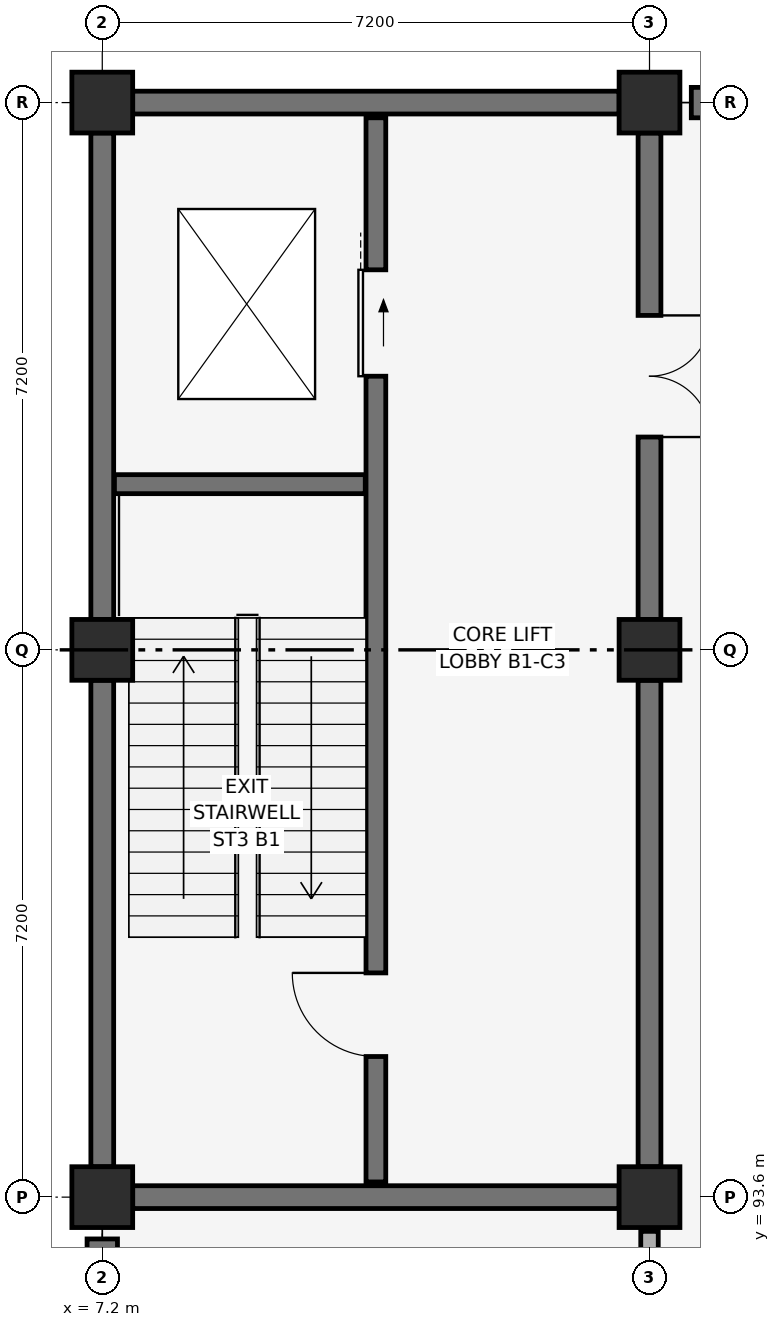
"""IFC4 building model, lengths in metres.
Left out: names, types, materials, properties, quantities, classifications, styles, units other than length and angle.
Written with IfcOpenShell. Run it as: python <this file> out.ifc"""

import sys

from ifc_helpers import new_model, si_unit, direction, frame, frame_2d, origin, origin_2d, place, context, subcontext, project, spatial, rectangle, extrude, element, fill, save


model = new_model("IFC4")
c1 = context("Model", 3, precision=1e-05, world=origin(), true_north=direction((0.0, 1.0)))
c2 = subcontext(c1, "Body", "Model", "MODEL_VIEW")
j1 = project(units=[si_unit("LENGTHUNIT", "METRE"), si_unit("PLANEANGLEUNIT", "RADIAN")], contexts=[c1])
p1 = place(None, origin())
s1 = spatial("IfcSite", under=j1, at=p1, CompositionType="ELEMENT")
p2 = place(p1, origin())
s2 = spatial("IfcBuilding", under=s1, at=p2, CompositionType="ELEMENT")
p3 = place(p2, frame((0.0, 0.0, -5.4)))
s3 = spatial("IfcBuildingStorey", under=s2, at=p3, CompositionType="ELEMENT", Elevation=-5.4)
for number, where, z_axis, x_axis in (
    (1, (7.2, 93.6, -0.45), (0.0, 0.0, 1.0), (1.0, 0.0, 0.0)),
    (2, (7.2, 100.8, -0.45), (0.0, 0.0, 1.0), (1.0, 0.0, 0.0)),
    (3, (7.2, 108.0, -0.45), (0.0, 0.0, 1.0), (1.0, 0.0, 0.0)),
    (4, (14.4, 93.6, -0.45), (0.0, 0.0, 1.0), (1.0, 0.0, 0.0)),
    (5, (14.4, 100.8, -0.45), (0.0, 0.0, 1.0), (1.0, 0.0, 0.0)),
    (6, (14.4, 108.0, -0.45), (0.0, 0.0, 1.0), (1.0, 0.0, 0.0)),
):
    element("IfcColumn", number, at=place(p3, frame(where, z_axis=z_axis, x_axis=x_axis)), inside=s3, PredefinedType="COLUMN", context=c2, shape_type="SweptSolid", body=[
        extrude(rectangle(XDim=0.8, YDim=0.8, at=origin_2d()), origin(), (0.0, 0.0, 1.0), 5.85),
    ])
for number, where, z_axis, x_axis in (
    (7, (14.95, 108.0, 0.0), (0.0, 0.0, 1.0), (1.0, 0.0, 0.0)),
    (8, (7.2, 86.95, 0.0), (0.0, 0.0, 1.0), (0.0, 1.0, 0.0)),
):
    element("IfcWall", number, at=place(p3, frame(where, z_axis=z_axis, x_axis=x_axis)), inside=s3, PredefinedType="USERDEFINED", context=c2, shape_type="SweptSolid", body=[
        extrude(rectangle(XDim=6.1, YDim=0.4, at=frame_2d((3.05, 0.0))), origin(), (0.0, 0.0, 1.0), 5.12),
    ])
for number, where, z_axis, x_axis in (
    (9, (7.6, 93.6, 0.0), (0.0, 0.0, 1.0), (1.0, 0.0, 0.0)),
    (10, (7.6, 108.0, 0.0), (0.0, 0.0, 1.0), (1.0, 0.0, 0.0)),
    (11, (7.2, 94.0, 0.0), (0.0, 0.0, 1.0), (0.0, 1.0, 0.0)),
):
    element("IfcWall", number, at=place(p3, frame(where, z_axis=z_axis, x_axis=x_axis)), inside=s3, PredefinedType="SHEAR", context=c2, shape_type="SweptSolid", body=[
        extrude(rectangle(XDim=6.4, YDim=0.3, at=frame_2d((3.2, 0.0))), origin(), (0.0, 0.0, 1.0), 5.12),
    ])
p4 = place(p3, frame((7.2, 101.2, 0.0), z_axis=(0.0, 0.0, 1.0), x_axis=(0.0, 1.0, 0.0)))
e12 = element("IfcWall", 12, at=p4, inside=s3, PredefinedType="SHEAR", context=c2, shape_type="SweptSolid", body=[
    extrude(rectangle(XDim=6.4, YDim=0.3, at=frame_2d((3.2, 0.0))), origin(), (0.0, 0.0, 1.0), 5.12),
])
p5 = place(p3, frame((14.4, 94.0, 0.0), z_axis=(0.0, 0.0, 1.0), x_axis=(0.0, 1.0, 0.0)))
e13 = element("IfcWall", 13, at=p5, inside=s3, PredefinedType="SHEAR", context=c2, shape_type="SweptSolid", body=[
    extrude(rectangle(XDim=6.4, YDim=0.3, at=frame_2d((3.2, 0.0))), origin(), (0.0, 0.0, 1.0), 5.12),
])
p6 = place(p3, frame((14.4, 101.2, 0.0), z_axis=(0.0, 0.0, 1.0), x_axis=(0.0, 1.0, 0.0)))
e14 = element("IfcWall", 14, at=p6, inside=s3, PredefinedType="SHEAR", context=c2, shape_type="SweptSolid", body=[
    extrude(rectangle(XDim=6.4, YDim=0.3, at=frame_2d((3.2, 0.0))), origin(), (0.0, 0.0, 1.0), 5.12),
])
p7 = place(p6, frame((2.4, 0.0, 0.0)))
e15 = element("IfcOpeningElement", 15, at=p7, cuts=e14, PredefinedType="OPENING", context=c2, shape_type="SweptSolid", body=[
    extrude(rectangle(XDim=1.6, YDim=2.2, at=frame_2d((0.8, 1.1))), frame((0.0, 0.165, 0.0), z_axis=(0.0, -1.0, 0.0), x_axis=(1.0, 0.0, 0.0)), (0.0, 0.0, 1.0), 0.33),
])
p8 = place(p3, frame((10.8, 93.8, 0.0), z_axis=(0.0, 0.0, 1.0), x_axis=(0.0, 1.0, 0.0)))
e16 = element("IfcWall", 16, at=p8, inside=s3, PredefinedType="SHEAR", context=c2, shape_type="SweptSolid", body=[
    extrude(rectangle(XDim=14.0, YDim=0.26, at=frame_2d((7.0, 0.0))), origin(), (0.0, 0.0, 1.0), 5.12),
])
p9 = place(p8, frame((1.65, 0.0, 0.0)))
e17 = element("IfcOpeningElement", 17, at=p9, cuts=e16, PredefinedType="OPENING", context=c2, shape_type="SweptSolid", body=[
    extrude(rectangle(XDim=1.1, YDim=2.15, at=frame_2d((0.55, 1.075))), frame((0.0, 0.145, 0.0), z_axis=(0.0, -1.0, 0.0), x_axis=(1.0, 0.0, 0.0)), (0.0, 0.0, 1.0), 0.29),
])
p10 = place(p8, frame((10.6, 0.0, 0.0)))
e18 = element("IfcOpeningElement", 18, at=p10, cuts=e16, PredefinedType="OPENING", context=c2, shape_type="SweptSolid", body=[
    extrude(rectangle(XDim=1.4, YDim=2.3, at=frame_2d((0.7, 1.15))), frame((0.0, 0.145, 0.0), z_axis=(0.0, -1.0, 0.0), x_axis=(1.0, 0.0, 0.0)), (0.0, 0.0, 1.0), 0.29),
])
p11 = place(p3, frame((7.36, 102.98, 0.0), z_axis=(0.0, 0.0, 1.0), x_axis=(1.0, 0.0, 0.0)))
e19 = element("IfcWall", 19, at=p11, inside=s3, PredefinedType="SHEAR", context=c2, shape_type="SweptSolid", body=[
    extrude(rectangle(XDim=3.3, YDim=0.25, at=frame_2d((1.65, 0.0))), origin(), (0.0, 0.0, 1.0), 5.12),
])
p12 = place(p3, frame((14.4, 87.0, 0.0), z_axis=(0.0, 0.0, 1.0), x_axis=(0.0, 1.0, 0.0)))
e20 = element("IfcWall", 20, at=p12, inside=s3, PredefinedType="SOLIDWALL", context=c2, shape_type="SweptSolid", body=[
    extrude(rectangle(XDim=6.15, YDim=0.23, at=frame_2d((3.075, 0.0))), origin(), (0.0, 0.0, 1.0), 4.37),
])
p13 = place(p9, origin())
e21 = element("IfcDoor", 21, at=p13, inside=s3, OperationType="SINGLE_SWING_RIGHT", PredefinedType="DOOR", context=c2, shape_type="SweptSolid", body=[
    extrude(rectangle(XDim=1.1, YDim=2.15, at=frame_2d((0.55, 1.075))), frame((0.0, 0.025, 0.0), z_axis=(0.0, -1.0, 0.0), x_axis=(1.0, 0.0, 0.0)), (0.0, 0.0, 1.0), 0.05),
])
fill(e17, e21)
p14 = place(p10, frame((1.4, 0.0, 0.0), z_axis=(0.0, 0.0, 1.0), x_axis=(-1.0, 0.0, 0.0)))
e22 = element("IfcDoor", 22, at=p14, inside=s3, OperationType="SLIDING_TO_RIGHT", PredefinedType="DOOR", context=c2, shape_type="SweptSolid", body=[
    extrude(rectangle(XDim=1.4, YDim=2.3, at=frame_2d((0.7, 1.15))), frame((0.0, 0.025, 0.0), z_axis=(0.0, -1.0, 0.0), x_axis=(1.0, 0.0, 0.0)), (0.0, 0.0, 1.0), 0.05),
])
fill(e18, e22)
p15 = place(p7, frame((1.6, 0.0, 0.0), z_axis=(0.0, 0.0, 1.0), x_axis=(-1.0, 0.0, 0.0)))
e23 = element("IfcDoor", 23, at=p15, inside=s3, OperationType="DOUBLE_SWING_LEFT", PredefinedType="DOOR", context=c2, shape_type="SweptSolid", body=[
    extrude(rectangle(XDim=1.6, YDim=2.2, at=frame_2d((0.8, 1.1))), frame((0.0, 0.025, 0.0), z_axis=(0.0, -1.0, 0.0), x_axis=(1.0, 0.0, 0.0)), (0.0, 0.0, 1.0), 0.05),
])
fill(e15, e23)
save(model, sys.argv[1])
